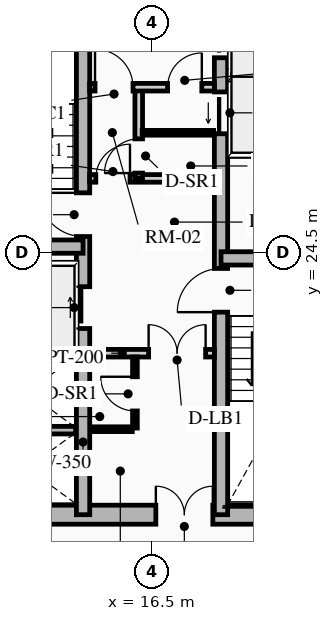
"""IFC4 building model, lengths in metres.
Left out: names, types, materials, properties, quantities, classifications, styles, units other than length and angle.
Written with IfcOpenShell. Run it as: python <this file> out.ifc"""

import sys

from ifc_helpers import new_model, si_unit, direction, frame, frame_2d, origin, place, context, subcontext, project, spatial, rectangle, extrude, source, transform, mapped, element, fill, save


model = new_model("IFC4")
c1 = context("Model", 3, precision=1e-05, world=origin(), true_north=direction((0.0, 1.0)))
c2 = subcontext(c1, "Body", "Model", "MODEL_VIEW")
j1 = project(units=[si_unit("LENGTHUNIT", "METRE"), si_unit("PLANEANGLEUNIT", "RADIAN")], contexts=[c1])
p1 = place(None, origin())
s1 = spatial("IfcSite", under=j1, at=p1, CompositionType="ELEMENT")
p2 = place(p1, origin())
s2 = spatial("IfcBuilding", under=s1, at=p2, CompositionType="ELEMENT")
p3 = place(p2, frame((0.0, 0.0, 51.1)))
s3 = spatial("IfcBuildingStorey", under=s2, at=p3, CompositionType="ELEMENT", Elevation=51.1)
p4 = place(p3, frame((11.15, 17.6, 0.0), z_axis=(0.0, 0.0, 1.0), x_axis=(1.0, 0.0, 0.0)))
e1 = element("IfcWall", 1, at=p4, inside=s3, PredefinedType="SHEAR", context=c2, shape_type="SweptSolid", body=[
    extrude(rectangle(XDim=10.7, YDim=0.5, at=frame_2d((5.35, 0.0))), origin(), (0.0, 0.0, 1.0), 2.91),
])
m1 = source(origin(), c2, "Body", "SweptSolid", [
    extrude(rectangle(XDim=1.5, YDim=2.02, at=frame_2d((0.75, 1.01))), frame((0.0, 0.26, 0.0), z_axis=(0.0, -1.0, 0.0), x_axis=(1.0, 0.0, 0.0)), (0.0, 0.0, 1.0), 0.52),
])
p5 = place(p4, frame((5.45, 0.0, 0.0)))
e2 = element("IfcOpeningElement", 2, at=p5, cuts=e1, PredefinedType="OPENING", context=c2, shape_type="MappedRepresentation", body=[
    mapped(m1, transform((0.0, 0.0, 0.0), x_axis=(1.0, 0.0, 0.0), y_axis=(0.0, 1.0, 0.0), z_axis=(0.0, 0.0, 1.0), scale=1.0)),
])
p6 = place(p3, frame((14.685, 17.6, 0.0), z_axis=(0.0, 0.0, 1.0), x_axis=(0.0, 1.0, 0.0)))
e3 = element("IfcWall", 3, at=p6, inside=s3, PredefinedType="SHEAR", context=c2, shape_type="SweptSolid", body=[
    extrude(rectangle(XDim=13.8, YDim=0.35, at=frame_2d((6.9, 0.0))), origin(), (0.0, 0.0, 1.0), 2.91),
])
m2 = source(origin(), c2, "Body", "SweptSolid", [
    extrude(rectangle(XDim=1.1, YDim=2.015, at=frame_2d((0.55, 1.007))), frame((0.0, 0.185, 0.0), z_axis=(0.0, -1.0, 0.0), x_axis=(1.0, 0.0, 0.0)), (0.0, 0.0, 1.0), 0.37),
])
p7 = place(p6, frame((4.9, 0.0, 0.0)))
e4 = element("IfcOpeningElement", 4, at=p7, cuts=e3, PredefinedType="OPENING", context=c2, shape_type="MappedRepresentation", body=[
    mapped(m2, transform((0.0, 0.0, 0.0), x_axis=(1.0, 0.0, 0.0), y_axis=(0.0, 1.0, 0.0), z_axis=(0.0, 0.0, 1.0), scale=1.0)),
])
m3 = source(origin(), c2, "Body", "SweptSolid", [
    extrude(rectangle(XDim=1.15, YDim=2.02, at=frame_2d((0.575, 1.01))), frame((0.0, 0.185, 0.0), z_axis=(0.0, -1.0, 0.0), x_axis=(1.0, 0.0, 0.0)), (0.0, 0.0, 1.0), 0.37),
])
p8 = place(p6, frame((7.32, 0.0, 0.0)))
e5 = element("IfcOpeningElement", 5, at=p8, cuts=e3, PredefinedType="OPENING", context=c2, shape_type="MappedRepresentation", body=[
    mapped(m3, transform((0.0, 0.0, 0.0), x_axis=(1.0, 0.0, 0.0), y_axis=(0.0, 1.0, 0.0), z_axis=(0.0, 0.0, 1.0), scale=1.0)),
])
p9 = place(p3, frame((18.315, 17.6, 0.0), z_axis=(0.0, 0.0, 1.0), x_axis=(0.0, 1.0, 0.0)))
e6 = element("IfcWall", 6, at=p9, inside=s3, PredefinedType="SHEAR", context=c2, shape_type="SweptSolid", body=[
    extrude(rectangle(XDim=13.8, YDim=0.35, at=frame_2d((6.9, 0.0))), origin(), (0.0, 0.0, 1.0), 2.91),
])
p10 = place(p9, frame((10.025, 0.0, 0.0)))
e7 = element("IfcOpeningElement", 7, at=p10, cuts=e6, PredefinedType="OPENING", context=c2, shape_type="MappedRepresentation", body=[
    mapped(m2, transform((0.0, 0.0, 0.0), x_axis=(1.0, 0.0, 0.0), y_axis=(0.0, 1.0, 0.0), z_axis=(0.0, 0.0, 1.0), scale=1.0)),
])
p11 = place(p9, frame((12.025, 0.0, 0.0)))
e8 = element("IfcOpeningElement", 8, at=p11, cuts=e6, PredefinedType="OPENING", context=c2, shape_type="MappedRepresentation", body=[
    mapped(m2, transform((0.0, 0.0, 0.0), x_axis=(1.0, 0.0, 0.0), y_axis=(0.0, 1.0, 0.0), z_axis=(0.0, 0.0, 1.0), scale=1.0)),
])
p12 = place(p9, frame((5.33, 0.0, 0.0)))
e9 = element("IfcOpeningElement", 9, at=p12, cuts=e6, PredefinedType="OPENING", context=c2, shape_type="MappedRepresentation", body=[
    mapped(m3, transform((0.0, 0.0, 0.0), x_axis=(1.0, 0.0, 0.0), y_axis=(0.0, 1.0, 0.0), z_axis=(0.0, 0.0, 1.0), scale=1.0)),
])
for number, where, z_axis, x_axis in (
    (10, (11.4, 24.655, 0.0), (0.0, 0.0, 1.0), (1.0, 0.0, 0.0)),
    (11, (18.315, 24.345, 0.0), (0.0, 0.0, 1.0), (1.0, 0.0, 0.0)),
):
    element("IfcWall", number, at=place(p3, frame(where, z_axis=z_axis, x_axis=x_axis)), inside=s3, PredefinedType="SHEAR", context=c2, shape_type="SweptSolid", body=[
        extrude(rectangle(XDim=3.285, YDim=0.35, at=frame_2d((1.643, 0.0))), origin(), (0.0, 0.0, 1.0), 2.91),
    ])
for number, where, z_axis, x_axis in (
    (12, (11.52, 21.8, 0.0), (0.0, 0.0, 1.0), (1.0, 0.0, 0.0)),
    (13, (11.52, 19.825, 0.0), (0.0, 0.0, 1.0), (1.0, 0.0, 0.0)),
    (14, (18.51, 27.13, 0.0), (0.0, 0.0, 1.0), (1.0, 0.0, 0.0)),
    (15, (18.51, 29.175, 0.0), (0.0, 0.0, 1.0), (1.0, 0.0, 0.0)),
):
    element("IfcWall", number, at=place(p3, frame(where, z_axis=z_axis, x_axis=x_axis)), inside=s3, PredefinedType="SHEAR", context=c2, shape_type="SweptSolid", body=[
        extrude(rectangle(XDim=2.97, YDim=0.2, at=frame_2d((1.485, 0.0))), origin(), (0.0, 0.0, 1.0), 2.91),
    ])
p13 = place(p3, frame((14.86, 21.85, 0.0), z_axis=(0.0, 0.0, 1.0), x_axis=(1.0, 0.0, 0.0)))
e16 = element("IfcWall", 16, at=p13, inside=s3, PredefinedType="PARTITIONING", context=c2, shape_type="SweptSolid", body=[
    extrude(rectangle(XDim=3.28, YDim=0.2, at=frame_2d((1.64, 0.0))), origin(), (0.0, 0.0, 1.0), 2.635),
])
m4 = source(origin(), c2, "Body", "SweptSolid", [
    extrude(rectangle(XDim=1.5, YDim=2.02, at=frame_2d((0.75, 1.01))), frame((0.0, 0.11, 0.0), z_axis=(0.0, -1.0, 0.0), x_axis=(1.0, 0.0, 0.0)), (0.0, 0.0, 1.0), 0.22),
])
p14 = place(p13, frame((1.55, 0.0, 0.0)))
e17 = element("IfcOpeningElement", 17, at=p14, cuts=e16, PredefinedType="OPENING", context=c2, shape_type="MappedRepresentation", body=[
    mapped(m4, transform((0.0, 0.0, 0.0), x_axis=(1.0, 0.0, 0.0), y_axis=(0.0, 1.0, 0.0), z_axis=(0.0, 0.0, 1.0), scale=1.0)),
])
p15 = place(p3, frame((14.86, 26.45, 0.0), z_axis=(0.0, 0.0, 1.0), x_axis=(1.0, 0.0, 0.0)))
e18 = element("IfcWall", 18, at=p15, inside=s3, PredefinedType="PARTITIONING", context=c2, shape_type="SweptSolid", body=[
    extrude(rectangle(XDim=3.28, YDim=0.2, at=frame_2d((1.64, 0.0))), origin(), (0.0, 0.0, 1.0), 2.635),
])
m5 = source(origin(), c2, "Body", "SweptSolid", [
    extrude(rectangle(XDim=0.9, YDim=2.005, at=frame_2d((0.45, 1.002))), frame((0.0, 0.11, 0.0), z_axis=(0.0, -1.0, 0.0), x_axis=(1.0, 0.0, 0.0)), (0.0, 0.0, 1.0), 0.22),
])
p16 = place(p15, frame((0.16, 0.0, 0.0)))
e19 = element("IfcOpeningElement", 19, at=p16, cuts=e18, PredefinedType="OPENING", context=c2, shape_type="MappedRepresentation", body=[
    mapped(m5, transform((0.0, 0.0, 0.0), x_axis=(1.0, 0.0, 0.0), y_axis=(0.0, 1.0, 0.0), z_axis=(0.0, 0.0, 1.0), scale=1.0)),
])
p17 = place(p3, frame((16.15, 26.45, 0.0), z_axis=(0.0, 0.0, 1.0), x_axis=(0.0, 1.0, 0.0)))
e20 = element("IfcWall", 20, at=p17, inside=s3, PredefinedType="PARTITIONING", context=c2, shape_type="SweptSolid", body=[
    extrude(rectangle(XDim=2.4, YDim=0.2, at=frame_2d((1.2, 0.0))), origin(), (0.0, 0.0, 1.0), 2.635),
])
p18 = place(p17, frame((0.14, 0.0, 0.0)))
e21 = element("IfcOpeningElement", 21, at=p18, cuts=e20, PredefinedType="OPENING", context=c2, shape_type="MappedRepresentation", body=[
    mapped(m5, transform((0.0, 0.0, 0.0), x_axis=(1.0, 0.0, 0.0), y_axis=(0.0, 1.0, 0.0), z_axis=(0.0, 0.0, 1.0), scale=1.0)),
])
p19 = place(p3, frame((14.86, 28.85, 0.0), z_axis=(0.0, 0.0, 1.0), x_axis=(1.0, 0.0, 0.0)))
e22 = element("IfcWall", 22, at=p19, inside=s3, PredefinedType="PARTITIONING", context=c2, shape_type="SweptSolid", body=[
    extrude(rectangle(XDim=3.28, YDim=0.2, at=frame_2d((1.64, 0.0))), origin(), (0.0, 0.0, 1.0), 2.635),
])
m6 = source(origin(), c2, "Body", "SweptSolid", [
    extrude(rectangle(XDim=1.0, YDim=2.015, at=frame_2d((0.5, 1.007))), frame((0.0, 0.11, 0.0), z_axis=(0.0, -1.0, 0.0), x_axis=(1.0, 0.0, 0.0)), (0.0, 0.0, 1.0), 0.22),
])
p20 = place(p19, frame((0.14, 0.0, 0.0)))
e23 = element("IfcOpeningElement", 23, at=p20, cuts=e22, PredefinedType="OPENING", context=c2, shape_type="MappedRepresentation", body=[
    mapped(m6, transform((0.0, 0.0, 0.0), x_axis=(1.0, 0.0, 0.0), y_axis=(0.0, 1.0, 0.0), z_axis=(0.0, 0.0, 1.0), scale=1.0)),
])
p21 = place(p19, frame((2.05, 0.0, 0.0)))
e24 = element("IfcOpeningElement", 24, at=p21, cuts=e22, PredefinedType="OPENING", context=c2, shape_type="MappedRepresentation", body=[
    mapped(m5, transform((0.0, 0.0, 0.0), x_axis=(1.0, 0.0, 0.0), y_axis=(0.0, 1.0, 0.0), z_axis=(0.0, 0.0, 1.0), scale=1.0)),
])
p22 = place(p3, frame((16.05, 19.88, 0.0), z_axis=(0.0, 0.0, 1.0), x_axis=(0.0, 1.0, 0.0)))
e25 = element("IfcWall", 25, at=p22, inside=s3, PredefinedType="PARTITIONING", context=c2, shape_type="SweptSolid", body=[
    extrude(rectangle(XDim=1.87, YDim=0.125, at=frame_2d((0.935, 0.0))), origin(), (0.0, 0.0, 1.0), 2.635),
])
m7 = source(origin(), c2, "Body", "SweptSolid", [
    extrude(rectangle(XDim=0.9, YDim=2.005, at=frame_2d((0.45, 1.002))), frame((0.0, 0.073, 0.0), z_axis=(0.0, -1.0, 0.0), x_axis=(1.0, 0.0, 0.0)), (0.0, 0.0, 1.0), 0.145),
])
p23 = place(p22, frame((0.45, 0.0, 0.0)))
e26 = element("IfcOpeningElement", 26, at=p23, cuts=e25, PredefinedType="OPENING", context=c2, shape_type="MappedRepresentation", body=[
    mapped(m7, transform((0.0, 0.0, 0.0), x_axis=(1.0, 0.0, 0.0), y_axis=(0.0, 1.0, 0.0), z_axis=(0.0, 0.0, 1.0), scale=1.0)),
])
p24 = place(p3, frame((14.88, 19.85, 0.0), z_axis=(0.0, 0.0, 1.0), x_axis=(1.0, 0.0, 0.0)))
e27 = element("IfcWall", 27, at=p24, inside=s3, PredefinedType="PARTITIONING", context=c2, shape_type="SweptSolid", body=[
    extrude(rectangle(XDim=1.1, YDim=0.125, at=frame_2d((0.55, 0.0))), origin(), (0.0, 0.0, 1.0), 2.635),
])
p25 = place(p3, frame((16.24, 27.65, 0.0), z_axis=(0.0, 0.0, 1.0), x_axis=(1.0, 0.0, 0.0)))
e28 = element("IfcWall", 28, at=p25, inside=s3, PredefinedType="PARTITIONING", context=c2, shape_type="SweptSolid", body=[
    extrude(rectangle(XDim=1.88, YDim=0.125, at=frame_2d((0.94, 0.0))), origin(), (0.0, 0.0, 1.0), 2.635),
])
m8 = source(origin(), c2, "Body", "SweptSolid", [
    extrude(rectangle(XDim=1.1, YDim=2.015, at=frame_2d((0.55, 1.007))), frame((0.0, 0.025, 0.0), z_axis=(0.0, -1.0, 0.0), x_axis=(1.0, 0.0, 0.0)), (0.0, 0.0, 1.0), 0.05),
])
p26 = place(p7, origin())
e29 = element("IfcDoor", 29, at=p26, inside=s3, OperationType="SLIDING_TO_RIGHT", PredefinedType="DOOR", context=c2, shape_type="MappedRepresentation", body=[
    mapped(m8, transform((0.0, 0.0, 0.0), x_axis=(1.0, 0.0, 0.0), y_axis=(0.0, 1.0, 0.0), z_axis=(0.0, 0.0, 1.0), scale=1.0)),
])
fill(e4, e29)
p27 = place(p10, origin())
e30 = element("IfcDoor", 30, at=p27, inside=s3, OperationType="SLIDING_TO_LEFT", PredefinedType="DOOR", context=c2, shape_type="MappedRepresentation", body=[
    mapped(m8, transform((0.0, 0.0, 0.0), x_axis=(1.0, 0.0, 0.0), y_axis=(0.0, 1.0, 0.0), z_axis=(0.0, 0.0, 1.0), scale=1.0)),
])
fill(e7, e30)
p28 = place(p11, origin())
e31 = element("IfcDoor", 31, at=p28, inside=s3, OperationType="SLIDING_TO_RIGHT", PredefinedType="DOOR", context=c2, shape_type="MappedRepresentation", body=[
    mapped(m8, transform((0.0, 0.0, 0.0), x_axis=(1.0, 0.0, 0.0), y_axis=(0.0, 1.0, 0.0), z_axis=(0.0, 0.0, 1.0), scale=1.0)),
])
fill(e8, e31)
m9 = source(origin(), c2, "Body", "SweptSolid", [
    extrude(rectangle(XDim=1.15, YDim=2.02, at=frame_2d((0.575, 1.01))), frame((0.0, 0.025, 0.0), z_axis=(0.0, -1.0, 0.0), x_axis=(1.0, 0.0, 0.0)), (0.0, 0.0, 1.0), 0.05),
])
p29 = place(p8, origin())
e32 = element("IfcDoor", 32, at=p29, inside=s3, OperationType="SINGLE_SWING_RIGHT", PredefinedType="DOOR", context=c2, shape_type="MappedRepresentation", body=[
    mapped(m9, transform((0.0, 0.0, 0.0), x_axis=(1.0, 0.0, 0.0), y_axis=(0.0, 1.0, 0.0), z_axis=(0.0, 0.0, 1.0), scale=1.0)),
])
fill(e5, e32)
p30 = place(p12, origin())
e33 = element("IfcDoor", 33, at=p30, inside=s3, OperationType="SINGLE_SWING_LEFT", PredefinedType="DOOR", context=c2, shape_type="MappedRepresentation", body=[
    mapped(m9, transform((0.0, 0.0, 0.0), x_axis=(1.0, 0.0, 0.0), y_axis=(0.0, 1.0, 0.0), z_axis=(0.0, 0.0, 1.0), scale=1.0)),
])
fill(e9, e33)
m10 = source(origin(), c2, "Body", "SweptSolid", [
    extrude(rectangle(XDim=1.5, YDim=2.02, at=frame_2d((0.75, 1.01))), frame((0.0, 0.025, 0.0), z_axis=(0.0, -1.0, 0.0), x_axis=(1.0, 0.0, 0.0)), (0.0, 0.0, 1.0), 0.05),
])
p31 = place(p5, origin())
e34 = element("IfcDoor", 34, at=p31, inside=s3, OperationType="DOUBLE_DOOR_SINGLE_SWING", PredefinedType="DOOR", context=c2, shape_type="MappedRepresentation", body=[
    mapped(m10, transform((0.0, 0.0, 0.0), x_axis=(1.0, 0.0, 0.0), y_axis=(0.0, 1.0, 0.0), z_axis=(0.0, 0.0, 1.0), scale=1.0)),
])
fill(e2, e34)
p32 = place(p14, origin())
e35 = element("IfcDoor", 35, at=p32, inside=s3, OperationType="DOUBLE_DOOR_SINGLE_SWING", PredefinedType="DOOR", context=c2, shape_type="MappedRepresentation", body=[
    mapped(m10, transform((0.0, 0.0, 0.0), x_axis=(1.0, 0.0, 0.0), y_axis=(0.0, 1.0, 0.0), z_axis=(0.0, 0.0, 1.0), scale=1.0)),
])
fill(e17, e35)
m11 = source(origin(), c2, "Body", "SweptSolid", [
    extrude(rectangle(XDim=0.9, YDim=2.005, at=frame_2d((0.45, 1.002))), frame((0.0, 0.025, 0.0), z_axis=(0.0, -1.0, 0.0), x_axis=(1.0, 0.0, 0.0)), (0.0, 0.0, 1.0), 0.05),
])
p33 = place(p16, origin())
e36 = element("IfcDoor", 36, at=p33, inside=s3, OperationType="SINGLE_SWING_RIGHT", PredefinedType="DOOR", context=c2, shape_type="MappedRepresentation", body=[
    mapped(m11, transform((0.0, 0.0, 0.0), x_axis=(1.0, 0.0, 0.0), y_axis=(0.0, 1.0, 0.0), z_axis=(0.0, 0.0, 1.0), scale=1.0)),
])
fill(e19, e36)
m12 = source(origin(), c2, "Body", "SweptSolid", [
    extrude(rectangle(XDim=1.0, YDim=2.015, at=frame_2d((0.5, 1.007))), frame((0.0, 0.025, 0.0), z_axis=(0.0, -1.0, 0.0), x_axis=(1.0, 0.0, 0.0)), (0.0, 0.0, 1.0), 0.05),
])
p34 = place(p20, origin())
e37 = element("IfcDoor", 37, at=p34, inside=s3, OperationType="SINGLE_SWING_LEFT", PredefinedType="DOOR", context=c2, shape_type="MappedRepresentation", body=[
    mapped(m12, transform((0.0, 0.0, 0.0), x_axis=(1.0, 0.0, 0.0), y_axis=(0.0, 1.0, 0.0), z_axis=(0.0, 0.0, 1.0), scale=1.0)),
])
fill(e23, e37)
p35 = place(p23, origin())
e38 = element("IfcDoor", 38, at=p35, inside=s3, OperationType="SINGLE_SWING_RIGHT", PredefinedType="DOOR", context=c2, shape_type="MappedRepresentation", body=[
    mapped(m11, transform((0.0, 0.0, 0.0), x_axis=(1.0, 0.0, 0.0), y_axis=(0.0, 1.0, 0.0), z_axis=(0.0, 0.0, 1.0), scale=1.0)),
])
fill(e26, e38)
p36 = place(p18, origin())
e39 = element("IfcDoor", 39, at=p36, inside=s3, OperationType="SINGLE_SWING_LEFT", PredefinedType="DOOR", context=c2, shape_type="MappedRepresentation", body=[
    mapped(m11, transform((0.0, 0.0, 0.0), x_axis=(1.0, 0.0, 0.0), y_axis=(0.0, 1.0, 0.0), z_axis=(0.0, 0.0, 1.0), scale=1.0)),
])
fill(e21, e39)
p37 = place(p21, origin())
e40 = element("IfcDoor", 40, at=p37, inside=s3, OperationType="SINGLE_SWING_RIGHT", PredefinedType="DOOR", context=c2, shape_type="MappedRepresentation", body=[
    mapped(m11, transform((0.0, 0.0, 0.0), x_axis=(1.0, 0.0, 0.0), y_axis=(0.0, 1.0, 0.0), z_axis=(0.0, 0.0, 1.0), scale=1.0)),
])
fill(e24, e40)
save(model, sys.argv[1])
